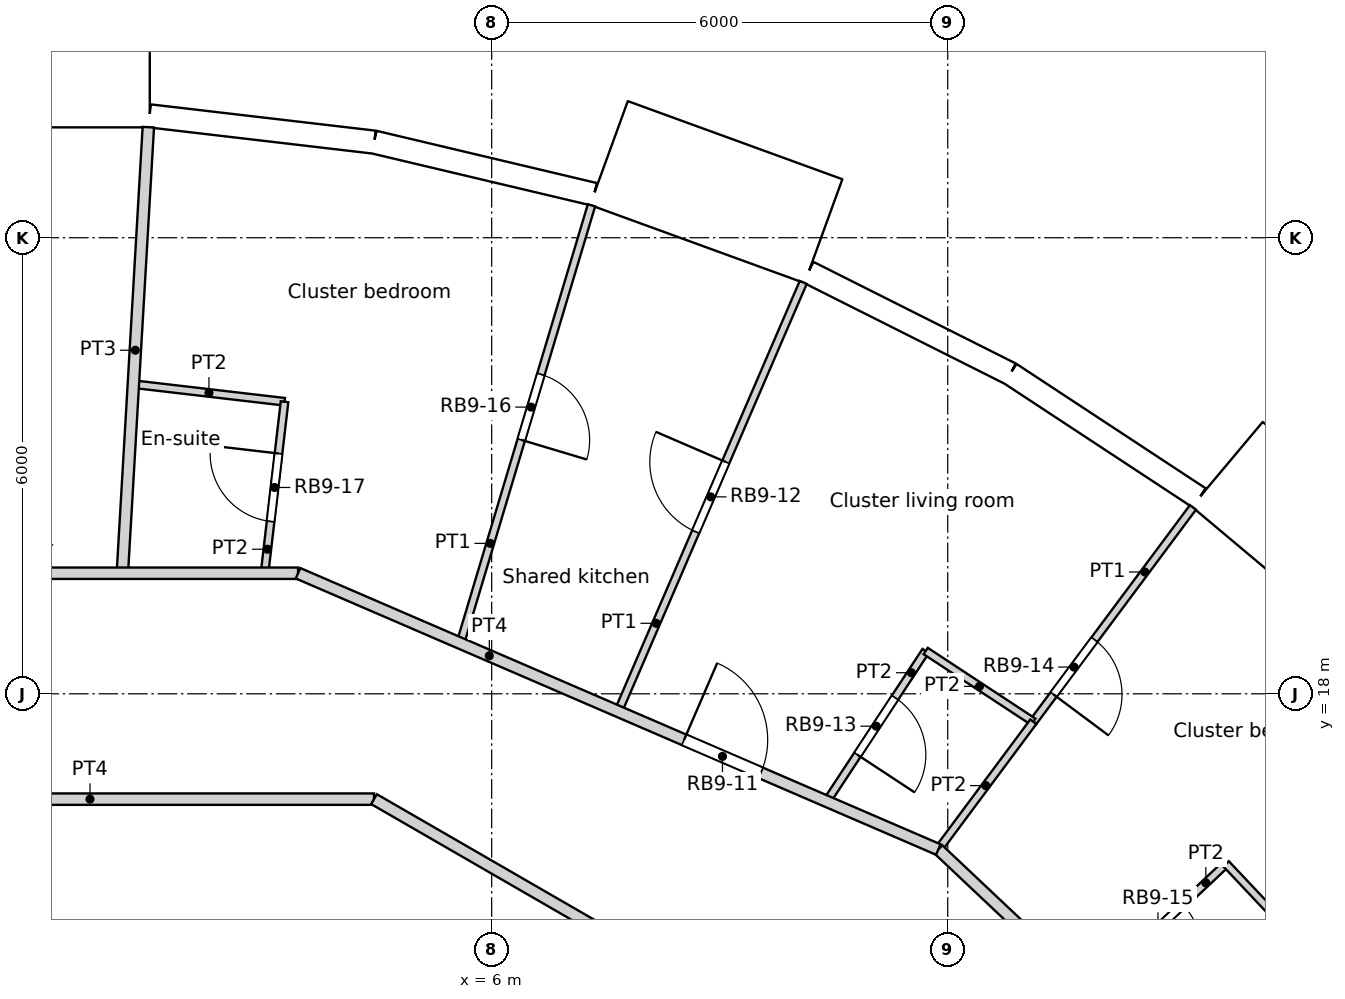
"""IFC4 building model, lengths in metres.
Left out: names, types, materials, properties, quantities, classifications, styles, units other than length and angle.
Written with IfcOpenShell. Run it as: python <this file> out.ifc"""

import sys

from ifc_helpers import new_model, si_unit, direction, frame, frame_2d, origin, origin_2d, place, context, subcontext, project, spatial, rectangle, circle, extrude, element, fill, save


model = new_model("IFC4")
c1 = context("Model", 3, precision=1e-05, world=origin(), true_north=direction((0.0, 1.0)))
c2 = subcontext(c1, "Body", "Model", "MODEL_VIEW")
j1 = project(units=[si_unit("LENGTHUNIT", "METRE"), si_unit("PLANEANGLEUNIT", "RADIAN")], contexts=[c1])
p1 = place(None, origin())
s1 = spatial("IfcSite", under=j1, at=p1, CompositionType="ELEMENT")
p2 = place(p1, origin())
s2 = spatial("IfcBuilding", under=s1, at=p2, CompositionType="ELEMENT")
p3 = place(p2, frame((0.0, 0.0, 212.4)))
s3 = spatial("IfcBuildingStorey", under=s2, at=p3, CompositionType="ELEMENT", Elevation=212.4)
for number, where, z_axis, x_axis in (
    (1, (14.659, 19.69, 0.0), (0.0, 0.0, 1.0), (1.0, 0.0, 0.0)),
    (2, (9.723, 22.54, 0.0), (0.0, 0.0, 1.0), (1.0, 0.0, 0.0)),
    (3, (4.263, 24.175, 0.0), (0.0, 0.0, 1.0), (1.0, 0.0, 0.0)),
):
    element("IfcColumn", number, at=place(p3, frame(where, z_axis=z_axis, x_axis=x_axis)), inside=s3, PredefinedType="COLUMN", context=c2, shape_type="SweptSolid", body=[
        extrude(circle(Radius=0.6, at=origin_2d()), origin(), (0.0, 0.0, 1.0), 3.6),
    ])
for number, where, z_axis, x_axis in (
    (4, (11.735, 14.716, 0.0), (0.0, 0.0, 1.0), (1.0, 0.0, 0.0)),
    (5, (6.876, 17.521, 0.0), (0.0, 0.0, 1.0), (1.0, 0.0, 0.0)),
    (6, (1.406, 18.77, 0.0), (0.0, 0.0, 1.0), (1.0, 0.0, 0.0)),
):
    element("IfcColumn", number, at=place(p3, frame(where, z_axis=z_axis, x_axis=x_axis)), inside=s3, PredefinedType="COLUMN", context=c2, shape_type="SweptSolid", body=[
        extrude(circle(Radius=0.65, at=origin_2d()), origin(), (0.0, 0.0, 1.0), 3.6),
    ])
p4 = place(p3, frame((17.977, 19.09, -0.3), z_axis=(0.0, 0.0, 1.0), x_axis=(-0.766022196139, 0.642814121673, 0.0)))
e7 = element("IfcWall", 7, at=p4, inside=s3, PredefinedType="ELEMENTEDWALL", context=c2, shape_type="SweptSolid", body=[
    extrude(rectangle(XDim=3.0, YDim=1.45, at=frame_2d((1.5, 0.0))), origin(), (0.0, 0.0, 1.0), 3.6),
])
p5 = place(p4, frame((1.5, 0.0, 1.85)))
e8 = element("IfcOpeningElement", 8, at=p5, cuts=e7, PredefinedType="OPENING", context=c2, shape_type="SweptSolid", body=[
    extrude(circle(Radius=0.9, at=origin_2d()), frame((0.0, 0.735, 0.0), z_axis=(0.0, -1.0, 0.0), x_axis=(1.0, 0.0, 0.0)), (0.0, 0.0, 1.0), 1.47),
])
p6 = place(p3, frame((15.308, 20.578, 0.0), z_axis=(0.0, 0.0, 1.0), x_axis=(-0.835470659512, 0.549535055382, 0.0)))
e9 = element("IfcWall", 9, at=p6, inside=s3, PredefinedType="SOLIDWALL", context=c2, shape_type="SweptSolid", body=[
    extrude(rectangle(XDim=2.973, YDim=0.3, at=frame_2d((1.487, 0.0))), origin(), (0.0, 0.0, 1.0), 3.3),
])
p7 = place(p6, frame((1.486, 0.0, 1.55)))
e10 = element("IfcOpeningElement", 10, at=p7, cuts=e9, PredefinedType="OPENING", context=c2, shape_type="SweptSolid", body=[
    extrude(circle(Radius=0.9, at=origin_2d()), frame((0.0, 0.16, 0.0), z_axis=(0.0, -1.0, 0.0), x_axis=(1.0, 0.0, 0.0)), (0.0, 0.0, 1.0), 0.32),
])
p8 = place(p3, frame((12.824, 22.211, 0.0), z_axis=(0.0, 0.0, 1.0), x_axis=(-0.893637442555, 0.448789618045, 0.0)))
e11 = element("IfcWall", 11, at=p8, inside=s3, PredefinedType="SOLIDWALL", context=c2, shape_type="SweptSolid", body=[
    extrude(rectangle(XDim=2.973, YDim=0.3, at=frame_2d((1.486, 0.0))), origin(), (0.0, 0.0, 1.0), 3.3),
])
p9 = place(p8, frame((1.486, 0.0, 1.55)))
e12 = element("IfcOpeningElement", 12, at=p9, cuts=e11, PredefinedType="OPENING", context=c2, shape_type="SweptSolid", body=[
    extrude(circle(Radius=0.9, at=origin_2d()), frame((0.0, 0.16, 0.0), z_axis=(0.0, -1.0, 0.0), x_axis=(1.0, 0.0, 0.0)), (0.0, 0.0, 1.0), 0.32),
])
p10 = place(p3, frame((10.363, 24.087, -0.3), z_axis=(0.0, 0.0, 1.0), x_axis=(-0.939686455819, 0.342037080957, 0.0)))
e13 = element("IfcWall", 13, at=p10, inside=s3, PredefinedType="ELEMENTEDWALL", context=c2, shape_type="SweptSolid", body=[
    extrude(rectangle(XDim=3.0, YDim=1.45, at=frame_2d((1.5, 0.0))), origin(), (0.0, 0.0, 1.0), 3.6),
])
p11 = place(p10, frame((1.5, 0.0, 1.85)))
e14 = element("IfcOpeningElement", 14, at=p11, cuts=e13, PredefinedType="OPENING", context=c2, shape_type="SweptSolid", body=[
    extrude(circle(Radius=0.9, at=origin_2d()), frame((0.0, 0.735, 0.0), z_axis=(0.0, -1.0, 0.0), x_axis=(1.0, 0.0, 0.0)), (0.0, 0.0, 1.0), 1.47),
])
p12 = place(p3, frame((7.346, 24.572, 0.0), z_axis=(0.0, 0.0, 1.0), x_axis=(-0.973049746156, 0.230595298102, 0.0)))
e15 = element("IfcWall", 15, at=p12, inside=s3, PredefinedType="SOLIDWALL", context=c2, shape_type="SweptSolid", body=[
    extrude(rectangle(XDim=2.973, YDim=0.3, at=frame_2d((1.486, 0.0))), origin(), (0.0, 0.0, 1.0), 3.3),
])
p13 = place(p12, frame((1.486, 0.0, 1.55)))
e16 = element("IfcOpeningElement", 16, at=p13, cuts=e15, PredefinedType="OPENING", context=c2, shape_type="SweptSolid", body=[
    extrude(circle(Radius=0.9, at=origin_2d()), frame((0.0, 0.16, 0.0), z_axis=(0.0, -1.0, 0.0), x_axis=(1.0, 0.0, 0.0)), (0.0, 0.0, 1.0), 0.32),
])
p14 = place(p3, frame((4.454, 25.258, 0.0), z_axis=(0.0, 0.0, 1.0), x_axis=(-0.993235542767, 0.116116995244, 0.0)))
e17 = element("IfcWall", 17, at=p14, inside=s3, PredefinedType="SOLIDWALL", context=c2, shape_type="SweptSolid", body=[
    extrude(rectangle(XDim=2.973, YDim=0.3, at=frame_2d((1.486, 0.0))), origin(), (0.0, 0.0, 1.0), 3.3),
])
p15 = place(p14, frame((1.486, 0.0, 1.55)))
e18 = element("IfcOpeningElement", 18, at=p15, cuts=e17, PredefinedType="OPENING", context=c2, shape_type="SweptSolid", body=[
    extrude(circle(Radius=0.9, at=origin_2d()), frame((0.0, 0.16, 0.0), z_axis=(0.0, -1.0, 0.0), x_axis=(1.0, 0.0, 0.0)), (0.0, 0.0, 1.0), 0.32),
])
p16 = place(p3, frame((1.5, 26.179, -0.3), z_axis=(0.0, 0.0, 1.0), x_axis=(-1.0, 0.0, 0.0)))
e19 = element("IfcWall", 19, at=p16, inside=s3, PredefinedType="ELEMENTEDWALL", context=c2, shape_type="SweptSolid", body=[
    extrude(rectangle(XDim=3.0, YDim=1.45, at=frame_2d((1.5, 0.0))), origin(), (0.0, 0.0, 1.0), 3.6),
])
p17 = place(p16, frame((1.5, 0.0, 1.85)))
e20 = element("IfcOpeningElement", 20, at=p17, cuts=e19, PredefinedType="OPENING", context=c2, shape_type="SweptSolid", body=[
    extrude(circle(Radius=0.9, at=origin_2d()), frame((0.0, 0.735, 0.0), z_axis=(0.0, -1.0, 0.0), x_axis=(1.0, 0.0, 0.0)), (0.0, 0.0, 1.0), 1.47),
])
p18 = place(p3, frame((11.877, 15.953, 0.0), z_axis=(0.0, 0.0, 1.0), x_axis=(0.727299029876, -0.686320713035, 0.0)))
e21 = element("IfcWall", 21, at=p18, inside=s3, PredefinedType="PARTITIONING", context=c2, shape_type="SweptSolid", body=[
    extrude(rectangle(XDim=4.617, YDim=0.15, at=frame_2d((2.309, 0.0))), origin(), (0.0, 0.0, 1.0), 3.15),
])
p19 = place(p3, frame((4.452, 16.614, 0.0), z_axis=(0.0, 0.0, 1.0), x_axis=(0.866005203721, -0.500034985904, 0.0)))
e22 = element("IfcWall", 22, at=p19, inside=s3, PredefinedType="PARTITIONING", context=c2, shape_type="SweptSolid", body=[
    extrude(rectangle(XDim=8.903, YDim=0.15, at=frame_2d((4.452, 0.0))), origin(), (0.0, 0.0, 1.0), 3.15),
])
p20 = place(p3, frame((-3.021, 16.614, 0.0), z_axis=(0.0, 0.0, 1.0), x_axis=(1.0, 0.0, 0.0)))
e23 = element("IfcWall", 23, at=p20, inside=s3, PredefinedType="PARTITIONING", context=c2, shape_type="SweptSolid", body=[
    extrude(rectangle(XDim=7.473, YDim=0.15, at=frame_2d((3.736, 0.0))), origin(), (0.0, 0.0, 1.0), 3.15),
])
p21 = place(p3, frame((3.453, 19.586, 0.0), z_axis=(0.0, 0.0, 1.0), x_axis=(0.918175908205, -0.396172944044, 0.0)))
e24 = element("IfcWall", 24, at=p21, inside=s3, PredefinedType="PARTITIONING", context=c2, shape_type="SweptSolid", body=[
    extrude(rectangle(XDim=9.173, YDim=0.15, at=frame_2d((4.587, 0.0))), origin(), (0.0, 0.0, 1.0), 3.15),
])
p22 = place(p21, frame((5.531, 0.0, 0.0)))
e25 = element("IfcOpeningElement", 25, at=p22, cuts=e24, PredefinedType="OPENING", context=c2, shape_type="SweptSolid", body=[
    extrude(rectangle(XDim=1.1, YDim=2.1, at=frame_2d((0.55, 1.05))), frame((0.0, 0.075, 0.0), z_axis=(0.0, -1.0, 0.0), x_axis=(1.0, 0.0, 0.0)), (0.0, 0.0, 1.0), 0.15),
])
p23 = place(p3, frame((-3.453, 19.586, 0.0), z_axis=(0.0, 0.0, 1.0), x_axis=(1.0, 0.0, 0.0)))
e26 = element("IfcWall", 26, at=p23, inside=s3, PredefinedType="PARTITIONING", context=c2, shape_type="SweptSolid", body=[
    extrude(rectangle(XDim=6.906, YDim=0.15, at=frame_2d((3.453, 0.0))), origin(), (0.0, 0.0, 1.0), 3.15),
])
p24 = place(p3, frame((7.665, 17.769, 0.0), z_axis=(0.0, 0.0, 1.0), x_axis=(0.396066155507, 0.918221977771, 0.0)))
e27 = element("IfcWall", 27, at=p24, inside=s3, PredefinedType="PARTITIONING", context=c2, shape_type="SweptSolid", body=[
    extrude(rectangle(XDim=6.146, YDim=0.1, at=frame_2d((3.073, 0.0))), origin(), (0.0, 0.0, 1.0), 3.15),
])
p25 = place(p24, frame((2.573, 0.0, 0.0)))
e28 = element("IfcOpeningElement", 28, at=p25, cuts=e27, PredefinedType="OPENING", context=c2, shape_type="SweptSolid", body=[
    extrude(rectangle(XDim=1.0, YDim=2.04, at=frame_2d((0.5, 1.02))), frame((0.0, 0.05, 0.0), z_axis=(0.0, -1.0, 0.0), x_axis=(1.0, 0.0, 0.0)), (0.0, 0.0, 1.0), 0.1),
])
p26 = place(p3, frame((11.71, 18.563, 0.0), z_axis=(0.0, 0.0, 1.0), x_axis=(0.835601560763, -0.549335991584, 0.0)))
e29 = element("IfcWall", 29, at=p26, inside=s3, PredefinedType="PARTITIONING", context=c2, shape_type="SweptSolid", body=[
    extrude(rectangle(XDim=1.695, YDim=0.1, at=frame_2d((0.847, 0.0))), origin(), (0.0, 0.0, 1.0), 3.15),
])
p27 = place(p3, frame((10.409, 16.585, 0.0), z_axis=(0.0, 0.0, 1.0), x_axis=(0.549525589293, 0.835476885804, 0.0)))
e30 = element("IfcWall", 30, at=p27, inside=s3, PredefinedType="PARTITIONING", context=c2, shape_type="SweptSolid", body=[
    extrude(rectangle(XDim=2.367, YDim=0.1, at=frame_2d((1.184, 0.0))), origin(), (0.0, 0.0, 1.0), 3.15),
])
p28 = place(p27, frame((0.733, 0.0, 0.0)))
e31 = element("IfcOpeningElement", 31, at=p28, cuts=e30, PredefinedType="OPENING", context=c2, shape_type="SweptSolid", body=[
    extrude(rectangle(XDim=0.9, YDim=2.0, at=frame_2d((0.45, 1.0))), frame((0.0, 0.05, 0.0), z_axis=(0.0, -1.0, 0.0), x_axis=(1.0, 0.0, 0.0)), (0.0, 0.0, 1.0), 0.1),
])
p29 = place(p3, frame((13.126, 17.632, 0.0), z_axis=(0.0, 0.0, 1.0), x_axis=(0.597307961824, 0.802011969201, 0.0)))
e32 = element("IfcWall", 32, at=p29, inside=s3, PredefinedType="PARTITIONING", context=c2, shape_type="SweptSolid", body=[
    extrude(rectangle(XDim=3.516, YDim=0.1, at=frame_2d((1.758, 0.0))), origin(), (0.0, 0.0, 1.0), 3.15),
])
p30 = place(p29, frame((0.447, 0.0, 0.0)))
e33 = element("IfcOpeningElement", 33, at=p30, cuts=e32, PredefinedType="OPENING", context=c2, shape_type="SweptSolid", body=[
    extrude(rectangle(XDim=0.9, YDim=2.1, at=frame_2d((0.45, 1.05))), frame((0.0, 0.05, 0.0), z_axis=(0.0, -1.0, 0.0), x_axis=(1.0, 0.0, 0.0)), (0.0, 0.0, 1.0), 0.1),
])
p31 = place(p3, frame((5.588, 18.665, 0.0), z_axis=(0.0, 0.0, 1.0), x_axis=(0.286859936776, 0.957972534404, 0.0)))
e34 = element("IfcWall", 34, at=p31, inside=s3, PredefinedType="PARTITIONING", context=c2, shape_type="SweptSolid", body=[
    extrude(rectangle(XDim=6.014, YDim=0.1, at=frame_2d((3.007, 0.0))), origin(), (0.0, 0.0, 1.0), 3.15),
])
p32 = place(p31, frame((2.793, 0.0, 0.0)))
e35 = element("IfcOpeningElement", 35, at=p32, cuts=e34, PredefinedType="OPENING", context=c2, shape_type="SweptSolid", body=[
    extrude(rectangle(XDim=0.9, YDim=2.1, at=frame_2d((0.45, 1.05))), frame((0.0, 0.05, 0.0), z_axis=(0.0, -1.0, 0.0), x_axis=(1.0, 0.0, 0.0)), (0.0, 0.0, 1.0), 0.1),
])
p33 = place(p3, frame((11.876, 15.952, 0.0), z_axis=(0.0, 0.0, 1.0), x_axis=(0.596899091673, 0.802316318144, 0.0)))
e36 = element("IfcWall", 36, at=p33, inside=s3, PredefinedType="PARTITIONING", context=c2, shape_type="SweptSolid", body=[
    extrude(rectangle(XDim=2.094, YDim=0.1, at=frame_2d((1.047, 0.0))), origin(), (0.0, 0.0, 1.0), 3.15),
])
p34 = place(p3, frame((15.662, 15.763, 0.0), z_axis=(0.0, 0.0, 1.0), x_axis=(0.686167098493, -0.727443958629, 0.0)))
e37 = element("IfcWall", 37, at=p34, inside=s3, PredefinedType="PARTITIONING", context=c2, shape_type="SweptSolid", body=[
    extrude(rectangle(XDim=2.011, YDim=0.1, at=frame_2d((1.005, 0.0))), origin(), (0.0, 0.0, 1.0), 3.15),
])
p35 = place(p3, frame((13.87, 14.072, 0.0), z_axis=(0.0, 0.0, 1.0), x_axis=(0.727320856717, 0.686297582237, 0.0)))
e38 = element("IfcWall", 38, at=p35, inside=s3, PredefinedType="PARTITIONING", context=c2, shape_type="SweptSolid", body=[
    extrude(rectangle(XDim=2.464, YDim=0.1, at=frame_2d((1.232, 0.0))), origin(), (0.0, 0.0, 1.0), 3.15),
])
p36 = place(p35, frame((0.782, 0.0, 0.0)))
e39 = element("IfcOpeningElement", 39, at=p36, cuts=e38, PredefinedType="OPENING", context=c2, shape_type="SweptSolid", body=[
    extrude(rectangle(XDim=0.9, YDim=2.04, at=frame_2d((0.45, 1.02))), frame((0.0, 0.05, 0.0), z_axis=(0.0, -1.0, 0.0), x_axis=(1.0, 0.0, 0.0)), (0.0, 0.0, 1.0), 0.1),
])
p37 = place(p3, frame((3.012, 19.586, 0.0), z_axis=(0.0, 0.0, 1.0), x_axis=(0.115762284594, 0.993276947012, 0.0)))
e40 = element("IfcWall", 40, at=p37, inside=s3, PredefinedType="PARTITIONING", context=c2, shape_type="SweptSolid", body=[
    extrude(rectangle(XDim=2.271, YDim=0.1, at=frame_2d((1.136, 0.0))), origin(), (0.0, 0.0, 1.0), 3.15),
])
p38 = place(p37, frame((0.686, 0.0, 0.0)))
e41 = element("IfcOpeningElement", 41, at=p38, cuts=e40, PredefinedType="OPENING", context=c2, shape_type="SweptSolid", body=[
    extrude(rectangle(XDim=0.9, YDim=2.04, at=frame_2d((0.45, 1.02))), frame((0.0, 0.05, 0.0), z_axis=(0.0, -1.0, 0.0), x_axis=(1.0, 0.0, 0.0)), (0.0, 0.0, 1.0), 0.1),
])
p39 = place(p3, frame((1.286, 22.074, 0.0), z_axis=(0.0, 0.0, 1.0), x_axis=(0.993269919916, -0.115822563388, 0.0)))
e42 = element("IfcWall", 42, at=p39, inside=s3, PredefinedType="PARTITIONING", context=c2, shape_type="SweptSolid", body=[
    extrude(rectangle(XDim=2.002, YDim=0.1, at=frame_2d((1.001, 0.0))), origin(), (0.0, 0.0, 1.0), 3.15),
])
p40 = place(p3, frame((1.141, 19.586, 0.0), z_axis=(0.0, 0.0, 1.0), x_axis=(0.058147412668, 0.998308007781, 0.0)))
e43 = element("IfcWall", 43, at=p40, inside=s3, PredefinedType="PARTITIONING", context=c2, shape_type="SweptSolid", body=[
    extrude(rectangle(XDim=5.878, YDim=0.15, at=frame_2d((2.939, 0.0))), origin(), (0.0, 0.0, 1.0), 3.15),
])
p41 = place(p5, origin())
e44 = element("IfcWindow", 44, at=p41, inside=s3, PartitioningType="SINGLE_PANEL", PredefinedType="WINDOW", context=c2, shape_type="SweptSolid", body=[
    extrude(circle(Radius=0.9, at=origin_2d()), frame((0.0, 0.695, 0.0), z_axis=(0.0, -1.0, 0.0), x_axis=(1.0, 0.0, 0.0)), (0.0, 0.0, 1.0), 0.1),
])
fill(e8, e44)
p42 = place(p7, origin())
e45 = element("IfcWindow", 45, at=p42, inside=s3, PartitioningType="SINGLE_PANEL", PredefinedType="WINDOW", context=c2, shape_type="SweptSolid", body=[
    extrude(circle(Radius=0.9, at=origin_2d()), frame((0.0, 0.12, 0.0), z_axis=(0.0, -1.0, 0.0), x_axis=(1.0, 0.0, 0.0)), (0.0, 0.0, 1.0), 0.1),
])
fill(e10, e45)
p43 = place(p9, origin())
e46 = element("IfcWindow", 46, at=p43, inside=s3, PartitioningType="SINGLE_PANEL", PredefinedType="WINDOW", context=c2, shape_type="SweptSolid", body=[
    extrude(circle(Radius=0.9, at=origin_2d()), frame((0.0, 0.12, 0.0), z_axis=(0.0, -1.0, 0.0), x_axis=(1.0, 0.0, 0.0)), (0.0, 0.0, 1.0), 0.1),
])
fill(e12, e46)
p44 = place(p11, origin())
e47 = element("IfcWindow", 47, at=p44, inside=s3, PartitioningType="SINGLE_PANEL", PredefinedType="WINDOW", context=c2, shape_type="SweptSolid", body=[
    extrude(circle(Radius=0.9, at=origin_2d()), frame((0.0, 0.695, 0.0), z_axis=(0.0, -1.0, 0.0), x_axis=(1.0, 0.0, 0.0)), (0.0, 0.0, 1.0), 0.1),
])
fill(e14, e47)
p45 = place(p13, origin())
e48 = element("IfcWindow", 48, at=p45, inside=s3, PartitioningType="SINGLE_PANEL", PredefinedType="WINDOW", context=c2, shape_type="SweptSolid", body=[
    extrude(circle(Radius=0.9, at=origin_2d()), frame((0.0, 0.12, 0.0), z_axis=(0.0, -1.0, 0.0), x_axis=(1.0, 0.0, 0.0)), (0.0, 0.0, 1.0), 0.1),
])
fill(e16, e48)
p46 = place(p15, origin())
e49 = element("IfcWindow", 49, at=p46, inside=s3, PartitioningType="SINGLE_PANEL", PredefinedType="WINDOW", context=c2, shape_type="SweptSolid", body=[
    extrude(circle(Radius=0.9, at=origin_2d()), frame((0.0, 0.12, 0.0), z_axis=(0.0, -1.0, 0.0), x_axis=(1.0, 0.0, 0.0)), (0.0, 0.0, 1.0), 0.1),
])
fill(e18, e49)
p47 = place(p17, origin())
e50 = element("IfcWindow", 50, at=p47, inside=s3, PartitioningType="SINGLE_PANEL", PredefinedType="WINDOW", context=c2, shape_type="SweptSolid", body=[
    extrude(circle(Radius=0.9, at=origin_2d()), frame((0.0, 0.695, 0.0), z_axis=(0.0, -1.0, 0.0), x_axis=(1.0, 0.0, 0.0)), (0.0, 0.0, 1.0), 0.1),
])
fill(e20, e50)
p48 = place(p22, origin())
e51 = element("IfcDoor", 51, at=p48, inside=s3, OperationType="SINGLE_SWING_LEFT", PredefinedType="DOOR", context=c2, shape_type="SweptSolid", body=[
    extrude(rectangle(XDim=1.1, YDim=2.1, at=frame_2d((0.55, 1.05))), frame((0.0, 0.025, 0.0), z_axis=(0.0, -1.0, 0.0), x_axis=(1.0, 0.0, 0.0)), (0.0, 0.0, 1.0), 0.05),
])
fill(e25, e51)
p49 = place(p25, origin())
e52 = element("IfcDoor", 52, at=p49, inside=s3, OperationType="SINGLE_SWING_RIGHT", PredefinedType="DOOR", context=c2, shape_type="SweptSolid", body=[
    extrude(rectangle(XDim=1.0, YDim=2.04, at=frame_2d((0.5, 1.02))), frame((0.0, 0.025, 0.0), z_axis=(0.0, -1.0, 0.0), x_axis=(1.0, 0.0, 0.0)), (0.0, 0.0, 1.0), 0.05),
])
fill(e28, e52)
p50 = place(p28, origin())
e53 = element("IfcDoor", 53, at=p50, inside=s3, OperationType="SINGLE_SWING_RIGHT", PredefinedType="DOOR", context=c2, shape_type="SweptSolid", body=[
    extrude(rectangle(XDim=0.9, YDim=2.0, at=frame_2d((0.45, 1.0))), frame((0.0, 0.025, 0.0), z_axis=(0.0, -1.0, 0.0), x_axis=(1.0, 0.0, 0.0)), (0.0, 0.0, 1.0), 0.05),
])
fill(e31, e53)
p51 = place(p30, origin())
e54 = element("IfcDoor", 54, at=p51, inside=s3, OperationType="SINGLE_SWING_RIGHT", PredefinedType="DOOR", context=c2, shape_type="SweptSolid", body=[
    extrude(rectangle(XDim=0.9, YDim=2.1, at=frame_2d((0.45, 1.05))), frame((0.0, 0.025, 0.0), z_axis=(0.0, -1.0, 0.0), x_axis=(1.0, 0.0, 0.0)), (0.0, 0.0, 1.0), 0.05),
])
fill(e33, e54)
p52 = place(p36, origin())
e55 = element("IfcDoor", 55, at=p52, inside=s3, OperationType="SINGLE_SWING_RIGHT", PredefinedType="DOOR", context=c2, shape_type="SweptSolid", body=[
    extrude(rectangle(XDim=0.9, YDim=2.04, at=frame_2d((0.45, 1.02))), frame((0.0, 0.025, 0.0), z_axis=(0.0, -1.0, 0.0), x_axis=(1.0, 0.0, 0.0)), (0.0, 0.0, 1.0), 0.05),
])
fill(e39, e55)
p53 = place(p32, origin())
e56 = element("IfcDoor", 56, at=p53, inside=s3, OperationType="SINGLE_SWING_RIGHT", PredefinedType="DOOR", context=c2, shape_type="SweptSolid", body=[
    extrude(rectangle(XDim=0.9, YDim=2.1, at=frame_2d((0.45, 1.05))), frame((0.0, 0.025, 0.0), z_axis=(0.0, -1.0, 0.0), x_axis=(1.0, 0.0, 0.0)), (0.0, 0.0, 1.0), 0.05),
])
fill(e35, e56)
p54 = place(p38, origin())
e57 = element("IfcDoor", 57, at=p54, inside=s3, OperationType="SINGLE_SWING_RIGHT", PredefinedType="DOOR", context=c2, shape_type="SweptSolid", body=[
    extrude(rectangle(XDim=0.9, YDim=2.04, at=frame_2d((0.45, 1.02))), frame((0.0, 0.025, 0.0), z_axis=(0.0, -1.0, 0.0), x_axis=(1.0, 0.0, 0.0)), (0.0, 0.0, 1.0), 0.05),
])
fill(e41, e57)
save(model, sys.argv[1])
